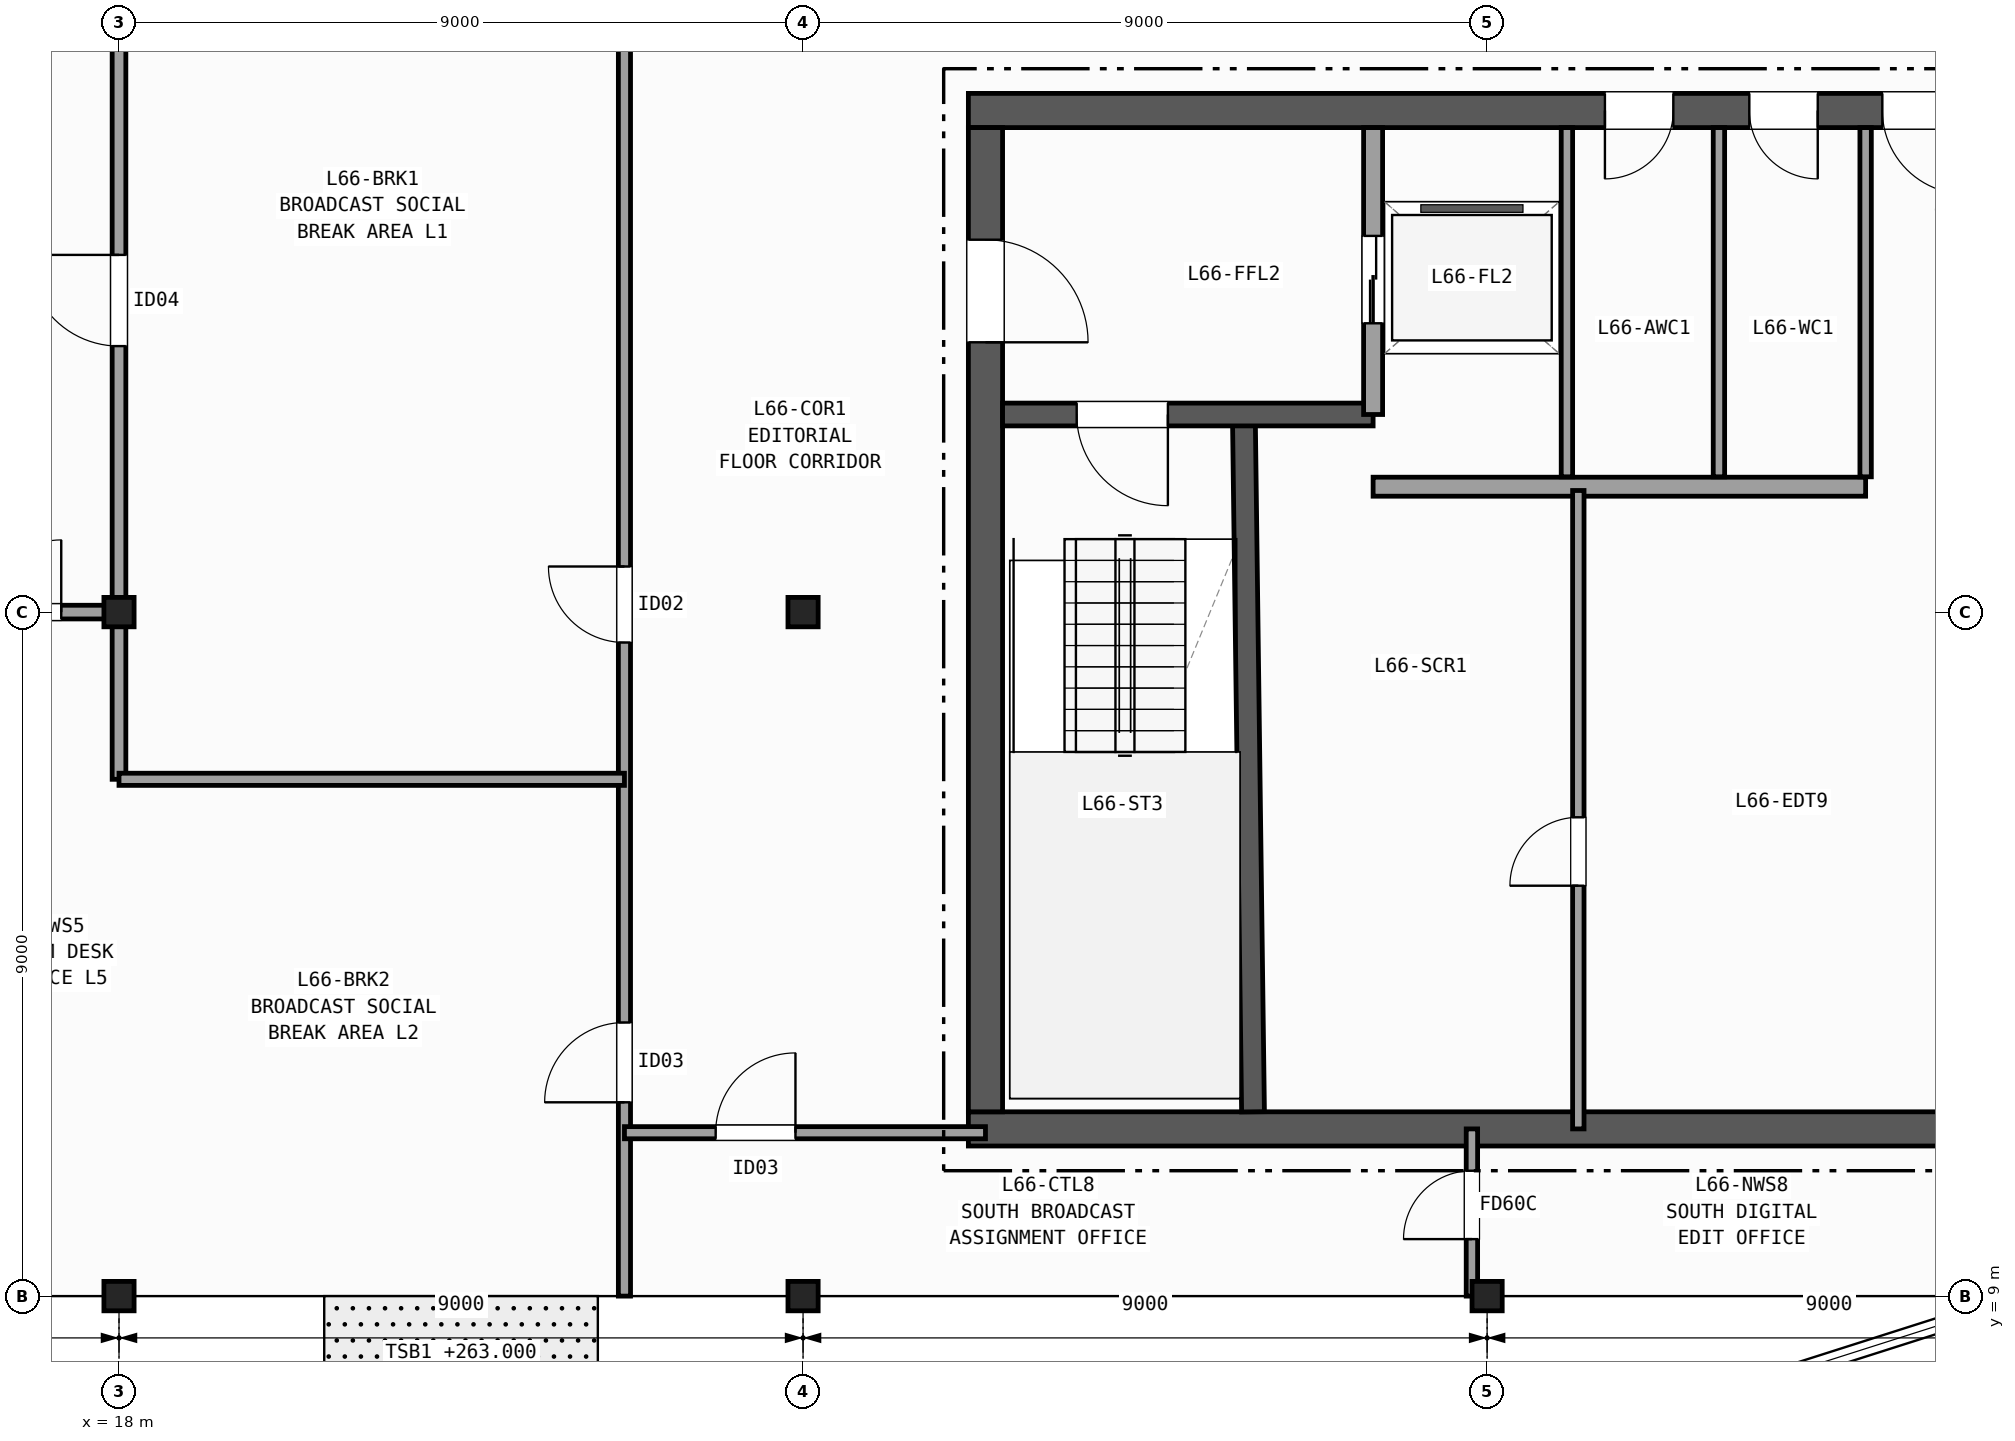
"""IFC4 building model, lengths in metres.
Left out: names, types, materials, properties, quantities, classifications, styles, units other than length and angle.
Written with IfcOpenShell. Run it as: python <this file> out.ifc"""

import sys

from ifc_helpers import new_model, si_unit, direction, frame, frame_2d, origin, origin_2d, place, context, subcontext, project, spatial, rectangle, i_section, extrude, element, fill, save


model = new_model("IFC4")
c1 = context("Model", 3, precision=1e-05, world=origin(), true_north=direction((0.0, 1.0)))
c2 = subcontext(c1, "Body", "Model", "MODEL_VIEW")
j1 = project(units=[si_unit("LENGTHUNIT", "METRE"), si_unit("PLANEANGLEUNIT", "RADIAN")], contexts=[c1])
p1 = place(None, origin())
s1 = spatial("IfcSite", under=j1, at=p1, CompositionType="ELEMENT")
p2 = place(p1, origin())
s2 = spatial("IfcBuilding", under=s1, at=p2, CompositionType="ELEMENT")
p3 = place(p2, frame((0.0, 0.0, 263.0)))
s3 = spatial("IfcBuildingStorey", under=s2, at=p3, CompositionType="ELEMENT", Elevation=263.0)
for number, where, z_axis, x_axis in (
    (1, (18.0, 9.0, 0.0), (0.0, 0.0, 1.0), (1.0, 0.0, 0.0)),
    (2, (18.0, 18.0, 0.0), (0.0, 0.0, 1.0), (1.0, 0.0, 0.0)),
    (3, (27.0, 9.0, 0.0), (0.0, 0.0, 1.0), (1.0, 0.0, 0.0)),
    (4, (27.0, 18.0, 0.0), (0.0, 0.0, 1.0), (1.0, 0.0, 0.0)),
    (5, (36.0, 9.0, 0.0), (0.0, 0.0, 1.0), (1.0, 0.0, 0.0)),
):
    element("IfcColumn", number, at=place(p3, frame(where, z_axis=z_axis, x_axis=x_axis)), inside=s3, PredefinedType="COLUMN", context=c2, shape_type="SweptSolid", body=[
        extrude(i_section(OverallWidth=0.397, OverallDepth=0.387, WebThickness=0.021, FlangeThickness=0.033, FilletRadius=0.015, at=origin_2d()), origin(), (0.0, 0.0, 1.0), 3.7),
    ])
p4 = place(p3, frame((29.175, 11.2, 0.0), z_axis=(0.0, 0.0, 1.0), x_axis=(1.0, 0.0, 0.0)))
e6 = element("IfcWall", 6, at=p4, inside=s3, PredefinedType="SHEAR", context=c2, shape_type="SweptSolid", body=[
    extrude(rectangle(XDim=13.85, YDim=0.45, at=frame_2d((6.925, 0.0))), origin(), (0.0, 0.0, 1.0), 3.42),
])
p5 = place(p3, frame((43.025, 24.6, 0.0), z_axis=(0.0, 0.0, 1.0), x_axis=(-1.0, 0.0, 0.0)))
e7 = element("IfcWall", 7, at=p5, inside=s3, PredefinedType="SHEAR", context=c2, shape_type="SweptSolid", body=[
    extrude(rectangle(XDim=13.85, YDim=0.45, at=frame_2d((6.925, 0.0))), origin(), (0.0, 0.0, 1.0), 3.42),
])
p6 = place(p5, frame((0.725, 0.0, 0.0)))
e8 = element("IfcOpeningElement", 8, at=p6, cuts=e7, PredefinedType="OPENING", context=c2, shape_type="SweptSolid", body=[
    extrude(rectangle(XDim=1.1, YDim=2.15, at=frame_2d((0.55, 1.075))), frame((0.0, 0.235, 0.0), z_axis=(0.0, -1.0, 0.0), x_axis=(1.0, 0.0, 0.0)), (0.0, 0.0, 1.0), 0.47),
])
p7 = place(p5, frame((2.675, 0.0, 0.0)))
e9 = element("IfcOpeningElement", 9, at=p7, cuts=e7, PredefinedType="OPENING", context=c2, shape_type="SweptSolid", body=[
    extrude(rectangle(XDim=0.9, YDim=2.1, at=frame_2d((0.45, 1.05))), frame((0.0, 0.235, 0.0), z_axis=(0.0, -1.0, 0.0), x_axis=(1.0, 0.0, 0.0)), (0.0, 0.0, 1.0), 0.47),
])
p8 = place(p5, frame((4.575, 0.0, 0.0)))
e10 = element("IfcOpeningElement", 10, at=p8, cuts=e7, PredefinedType="OPENING", context=c2, shape_type="SweptSolid", body=[
    extrude(rectangle(XDim=0.9, YDim=2.1, at=frame_2d((0.45, 1.05))), frame((0.0, 0.235, 0.0), z_axis=(0.0, -1.0, 0.0), x_axis=(1.0, 0.0, 0.0)), (0.0, 0.0, 1.0), 0.47),
])
p9 = place(p3, frame((29.4, 24.375, 0.0), z_axis=(0.0, 0.0, 1.0), x_axis=(0.0, -1.0, 0.0)))
e11 = element("IfcWall", 11, at=p9, inside=s3, PredefinedType="SHEAR", context=c2, shape_type="SweptSolid", body=[
    extrude(rectangle(XDim=12.95, YDim=0.45, at=frame_2d((6.475, 0.0))), origin(), (0.0, 0.0, 1.0), 3.42),
])
p10 = place(p9, frame((1.475, 0.0, 0.0)))
e12 = element("IfcOpeningElement", 12, at=p10, cuts=e11, PredefinedType="OPENING", context=c2, shape_type="SweptSolid", body=[
    extrude(rectangle(XDim=1.35, YDim=2.15, at=frame_2d((0.675, 1.075))), frame((0.0, 0.235, 0.0), z_axis=(0.0, -1.0, 0.0), x_axis=(1.0, 0.0, 0.0)), (0.0, 0.0, 1.0), 0.47),
])
p11 = place(p3, frame((32.92, 11.425, 0.0), z_axis=(0.0, 0.0, 1.0), x_axis=(-0.013135638869, 0.999913723774, 0.0)))
e13 = element("IfcWall", 13, at=p11, inside=s3, PredefinedType="SHEAR", context=c2, shape_type="SweptSolid", body=[
    extrude(rectangle(XDim=9.126, YDim=0.3, at=frame_2d((4.563, 0.0))), origin(), (0.0, 0.0, 1.0), 3.42),
])
p12 = place(p3, frame((34.5, 20.6, 0.0), z_axis=(0.0, 0.0, 1.0), x_axis=(-1.0, 0.0, 0.0)))
e14 = element("IfcWall", 14, at=p12, inside=s3, PredefinedType="SHEAR", context=c2, shape_type="SweptSolid", body=[
    extrude(rectangle(XDim=4.875, YDim=0.3, at=frame_2d((2.438, 0.0))), origin(), (0.0, 0.0, 1.0), 3.42),
])
p13 = place(p12, frame((2.7, 0.0, 0.0)))
e15 = element("IfcOpeningElement", 15, at=p13, cuts=e14, PredefinedType="OPENING", context=c2, shape_type="SweptSolid", body=[
    extrude(rectangle(XDim=1.2, YDim=2.15, at=frame_2d((0.6, 1.075))), frame((0.0, 0.16, 0.0), z_axis=(0.0, -1.0, 0.0), x_axis=(1.0, 0.0, 0.0)), (0.0, 0.0, 1.0), 0.32),
])
p14 = place(p3, frame((34.5, 20.6, 0.0), z_axis=(0.0, 0.0, 1.0), x_axis=(0.0, 1.0, 0.0)))
e16 = element("IfcWall", 16, at=p14, inside=s3, PredefinedType="PARTITIONING", context=c2, shape_type="SweptSolid", body=[
    extrude(rectangle(XDim=3.775, YDim=0.25, at=frame_2d((1.887, 0.0))), origin(), (0.0, 0.0, 1.0), 3.42),
])
p15 = place(p14, frame((1.2, 0.0, 0.0)))
e17 = element("IfcOpeningElement", 17, at=p15, cuts=e16, PredefinedType="OPENING", context=c2, shape_type="SweptSolid", body=[
    extrude(rectangle(XDim=1.15, YDim=2.15, at=frame_2d((0.575, 1.075))), frame((0.0, 0.135, 0.0), z_axis=(0.0, -1.0, 0.0), x_axis=(1.0, 0.0, 0.0)), (0.0, 0.0, 1.0), 0.27),
])
p16 = place(p3, frame((34.5, 19.65, 0.0), z_axis=(0.0, 0.0, 1.0), x_axis=(1.0, 0.0, 0.0)))
e18 = element("IfcWall", 18, at=p16, inside=s3, PredefinedType="PARTITIONING", context=c2, shape_type="SweptSolid", body=[
    extrude(rectangle(XDim=6.48, YDim=0.25, at=frame_2d((3.24, 0.0))), origin(), (0.0, 0.0, 1.0), 3.42),
])
p17 = place(p3, frame((37.2, 11.2, 0.0), z_axis=(0.0, 0.0, 1.0), x_axis=(0.0, 1.0, 0.0)))
e19 = element("IfcWall", 19, at=p17, inside=s3, PredefinedType="PARTITIONING", context=c2, shape_type="SweptSolid", body=[
    extrude(rectangle(XDim=8.4, YDim=0.15, at=frame_2d((4.2, 0.0))), origin(), (0.0, 0.0, 1.0), 3.42),
])
p18 = place(p17, frame((3.2, 0.0, 0.0)))
e20 = element("IfcOpeningElement", 20, at=p18, cuts=e19, PredefinedType="OPENING", context=c2, shape_type="SweptSolid", body=[
    extrude(rectangle(XDim=0.9, YDim=2.1, at=frame_2d((0.45, 1.05))), frame((0.0, 0.085, 0.0), z_axis=(0.0, -1.0, 0.0), x_axis=(1.0, 0.0, 0.0)), (0.0, 0.0, 1.0), 0.17),
])
for number, where, z_axis, x_axis in (
    (21, (37.05, 19.78, 0.0), (0.0, 0.0, 1.0), (0.0, 1.0, 0.0)),
    (22, (39.05, 19.78, 0.0), (0.0, 0.0, 1.0), (0.0, 1.0, 0.0)),
    (23, (40.98, 19.78, 0.0), (0.0, 0.0, 1.0), (0.0, 1.0, 0.0)),
):
    element("IfcWall", number, at=place(p3, frame(where, z_axis=z_axis, x_axis=x_axis)), inside=s3, PredefinedType="PARTITIONING", context=c2, shape_type="SweptSolid", body=[
        extrude(rectangle(XDim=4.595, YDim=0.15, at=frame_2d((2.297, 0.0))), origin(), (0.0, 0.0, 1.0), 3.42),
    ])
p19 = place(p3, frame((24.65, 9.0, 0.0), z_axis=(0.0, 0.0, 1.0), x_axis=(0.0, 1.0, 0.0)))
e24 = element("IfcWall", 24, at=p19, inside=s3, PredefinedType="PARTITIONING", context=c2, shape_type="SweptSolid", body=[
    extrude(rectangle(XDim=19.2, YDim=0.16, at=frame_2d((9.6, 0.0))), origin(), (0.0, 0.0, 1.0), 2.707),
])
p20 = place(p19, frame((8.6, 0.0, 0.0)))
e25 = element("IfcOpeningElement", 25, at=p20, cuts=e24, PredefinedType="OPENING", context=c2, shape_type="SweptSolid", body=[
    extrude(rectangle(XDim=1.0, YDim=2.1, at=frame_2d((0.5, 1.05))), frame((0.0, 0.09, 0.0), z_axis=(0.0, -1.0, 0.0), x_axis=(1.0, 0.0, 0.0)), (0.0, 0.0, 1.0), 0.18),
])
p21 = place(p19, frame((2.55, 0.0, 0.0)))
e26 = element("IfcOpeningElement", 26, at=p21, cuts=e24, PredefinedType="OPENING", context=c2, shape_type="SweptSolid", body=[
    extrude(rectangle(XDim=1.05, YDim=2.15, at=frame_2d((0.525, 1.075))), frame((0.0, 0.09, 0.0), z_axis=(0.0, -1.0, 0.0), x_axis=(1.0, 0.0, 0.0)), (0.0, 0.0, 1.0), 0.18),
])
p22 = place(p3, frame((9.0, 18.0, 0.0), z_axis=(0.0, 0.0, 1.0), x_axis=(1.0, 0.0, 0.0)))
e27 = element("IfcWall", 27, at=p22, inside=s3, PredefinedType="PARTITIONING", context=c2, shape_type="SweptSolid", body=[
    extrude(rectangle(XDim=9.08, YDim=0.18, at=frame_2d((4.54, 0.0))), origin(), (0.0, 0.0, 1.0), 2.707),
])
p23 = place(p22, frame((7.29, 0.0, 0.0)))
e28 = element("IfcOpeningElement", 28, at=p23, cuts=e27, PredefinedType="OPENING", context=c2, shape_type="SweptSolid", body=[
    extrude(rectangle(XDim=0.95, YDim=2.1, at=frame_2d((0.475, 1.05))), frame((0.0, 0.1, 0.0), z_axis=(0.0, -1.0, 0.0), x_axis=(1.0, 0.0, 0.0)), (0.0, 0.0, 1.0), 0.2),
])
p24 = place(p3, frame((18.0, 15.8, 0.0), z_axis=(0.0, 0.0, 1.0), x_axis=(0.0, 1.0, 0.0)))
e29 = element("IfcWall", 29, at=p24, inside=s3, PredefinedType="PARTITIONING", context=c2, shape_type="SweptSolid", body=[
    extrude(rectangle(XDim=12.33, YDim=0.18, at=frame_2d((6.165, 0.0))), origin(), (0.0, 0.0, 1.0), 2.789),
])
p25 = place(p24, frame((5.7, 0.0, 0.0)))
e30 = element("IfcOpeningElement", 30, at=p25, cuts=e29, PredefinedType="OPENING", context=c2, shape_type="SweptSolid", body=[
    extrude(rectangle(XDim=1.2, YDim=2.15, at=frame_2d((0.6, 1.075))), frame((0.0, 0.1, 0.0), z_axis=(0.0, -1.0, 0.0), x_axis=(1.0, 0.0, 0.0)), (0.0, 0.0, 1.0), 0.2),
])
p26 = place(p3, frame((18.0, 15.8, 0.0), z_axis=(0.0, 0.0, 1.0), x_axis=(1.0, 0.0, 0.0)))
e31 = element("IfcWall", 31, at=p26, inside=s3, PredefinedType="PARTITIONING", context=c2, shape_type="SweptSolid", body=[
    extrude(rectangle(XDim=6.65, YDim=0.16, at=frame_2d((3.325, 0.0))), origin(), (0.0, 0.0, 1.0), 2.789),
])
p27 = place(p3, frame((24.65, 11.15, 0.0), z_axis=(0.0, 0.0, 1.0), x_axis=(1.0, 0.0, 0.0)))
e32 = element("IfcWall", 32, at=p27, inside=s3, PredefinedType="PARTITIONING", context=c2, shape_type="SweptSolid", body=[
    extrude(rectangle(XDim=4.75, YDim=0.16, at=frame_2d((2.375, 0.0))), origin(), (0.0, 0.0, 1.0), 2.792),
])
p28 = place(p27, frame((1.2, 0.0, 0.0)))
e33 = element("IfcOpeningElement", 33, at=p28, cuts=e32, PredefinedType="OPENING", context=c2, shape_type="SweptSolid", body=[
    extrude(rectangle(XDim=1.05, YDim=2.15, at=frame_2d((0.525, 1.075))), frame((0.0, 0.09, 0.0), z_axis=(0.0, -1.0, 0.0), x_axis=(1.0, 0.0, 0.0)), (0.0, 0.0, 1.0), 0.18),
])
p29 = place(p3, frame((35.8, 9.0, 0.0), z_axis=(0.0, 0.0, 1.0), x_axis=(0.0, 1.0, 0.0)))
e34 = element("IfcWall", 34, at=p29, inside=s3, PredefinedType="PARTITIONING", context=c2, shape_type="SweptSolid", body=[
    extrude(rectangle(XDim=2.2, YDim=0.15, at=frame_2d((1.1, 0.0))), origin(), (0.0, 0.0, 1.0), 2.707),
])
p30 = place(p29, frame((0.75, 0.0, 0.0)))
e35 = element("IfcOpeningElement", 35, at=p30, cuts=e34, PredefinedType="OPENING", context=c2, shape_type="SweptSolid", body=[
    extrude(rectangle(XDim=0.9, YDim=2.1, at=frame_2d((0.45, 1.05))), frame((0.0, 0.085, 0.0), z_axis=(0.0, -1.0, 0.0), x_axis=(1.0, 0.0, 0.0)), (0.0, 0.0, 1.0), 0.17),
])
p31 = place(p13, origin())
e36 = element("IfcDoor", 36, at=p31, inside=s3, OperationType="SINGLE_SWING_LEFT", PredefinedType="DOOR", context=c2, shape_type="SweptSolid", body=[
    extrude(rectangle(XDim=1.2, YDim=2.15, at=frame_2d((0.6, 1.075))), frame((0.0, 0.025, 0.0), z_axis=(0.0, -1.0, 0.0), x_axis=(1.0, 0.0, 0.0)), (0.0, 0.0, 1.0), 0.05),
])
fill(e15, e36)
p32 = place(p10, origin())
e37 = element("IfcDoor", 37, at=p32, inside=s3, OperationType="SINGLE_SWING_RIGHT", PredefinedType="DOOR", context=c2, shape_type="SweptSolid", body=[
    extrude(rectangle(XDim=1.35, YDim=2.15, at=frame_2d((0.675, 1.075))), frame((0.0, 0.025, 0.0), z_axis=(0.0, -1.0, 0.0), x_axis=(1.0, 0.0, 0.0)), (0.0, 0.0, 1.0), 0.05),
])
fill(e12, e37)
p33 = place(p6, origin())
e38 = element("IfcDoor", 38, at=p33, inside=s3, OperationType="SINGLE_SWING_LEFT", PredefinedType="DOOR", context=c2, shape_type="SweptSolid", body=[
    extrude(rectangle(XDim=1.1, YDim=2.15, at=frame_2d((0.55, 1.075))), frame((0.0, 0.025, 0.0), z_axis=(0.0, -1.0, 0.0), x_axis=(1.0, 0.0, 0.0)), (0.0, 0.0, 1.0), 0.05),
])
fill(e8, e38)
p34 = place(p7, origin())
e39 = element("IfcDoor", 39, at=p34, inside=s3, OperationType="SINGLE_SWING_LEFT", PredefinedType="DOOR", context=c2, shape_type="SweptSolid", body=[
    extrude(rectangle(XDim=0.9, YDim=2.1, at=frame_2d((0.45, 1.05))), frame((0.0, 0.025, 0.0), z_axis=(0.0, -1.0, 0.0), x_axis=(1.0, 0.0, 0.0)), (0.0, 0.0, 1.0), 0.05),
])
fill(e9, e39)
p35 = place(p8, origin())
e40 = element("IfcDoor", 40, at=p35, inside=s3, OperationType="SINGLE_SWING_RIGHT", PredefinedType="DOOR", context=c2, shape_type="SweptSolid", body=[
    extrude(rectangle(XDim=0.9, YDim=2.1, at=frame_2d((0.45, 1.05))), frame((0.0, 0.025, 0.0), z_axis=(0.0, -1.0, 0.0), x_axis=(1.0, 0.0, 0.0)), (0.0, 0.0, 1.0), 0.05),
])
fill(e10, e40)
p36 = place(p15, origin())
e41 = element("IfcDoor", 41, at=p36, inside=s3, OperationType="DOUBLE_DOOR_SLIDING", PredefinedType="DOOR", context=c2, shape_type="SweptSolid", body=[
    extrude(rectangle(XDim=1.15, YDim=2.15, at=frame_2d((0.575, 1.075))), frame((0.0, 0.025, 0.0), z_axis=(0.0, -1.0, 0.0), x_axis=(1.0, 0.0, 0.0)), (0.0, 0.0, 1.0), 0.05),
])
fill(e17, e41)
p37 = place(p18, origin())
e42 = element("IfcDoor", 42, at=p37, inside=s3, OperationType="SINGLE_SWING_LEFT", PredefinedType="DOOR", context=c2, shape_type="SweptSolid", body=[
    extrude(rectangle(XDim=0.9, YDim=2.1, at=frame_2d((0.45, 1.05))), frame((0.0, 0.025, 0.0), z_axis=(0.0, -1.0, 0.0), x_axis=(1.0, 0.0, 0.0)), (0.0, 0.0, 1.0), 0.05),
])
fill(e20, e42)
p38 = place(p20, origin())
e43 = element("IfcDoor", 43, at=p38, inside=s3, OperationType="SINGLE_SWING_RIGHT", PredefinedType="DOOR", context=c2, shape_type="SweptSolid", body=[
    extrude(rectangle(XDim=1.0, YDim=2.1, at=frame_2d((0.5, 1.05))), frame((0.0, 0.025, 0.0), z_axis=(0.0, -1.0, 0.0), x_axis=(1.0, 0.0, 0.0)), (0.0, 0.0, 1.0), 0.05),
])
fill(e25, e43)
p39 = place(p21, origin())
e44 = element("IfcDoor", 44, at=p39, inside=s3, OperationType="SINGLE_SWING_LEFT", PredefinedType="DOOR", context=c2, shape_type="SweptSolid", body=[
    extrude(rectangle(XDim=1.05, YDim=2.15, at=frame_2d((0.525, 1.075))), frame((0.0, 0.025, 0.0), z_axis=(0.0, -1.0, 0.0), x_axis=(1.0, 0.0, 0.0)), (0.0, 0.0, 1.0), 0.05),
])
fill(e26, e44)
p40 = place(p25, origin())
e45 = element("IfcDoor", 45, at=p40, inside=s3, OperationType="SINGLE_SWING_RIGHT", PredefinedType="DOOR", context=c2, shape_type="SweptSolid", body=[
    extrude(rectangle(XDim=1.2, YDim=2.15, at=frame_2d((0.6, 1.075))), frame((0.0, 0.025, 0.0), z_axis=(0.0, -1.0, 0.0), x_axis=(1.0, 0.0, 0.0)), (0.0, 0.0, 1.0), 0.05),
])
fill(e30, e45)
p41 = place(p23, origin())
e46 = element("IfcDoor", 46, at=p41, inside=s3, OperationType="SINGLE_SWING_RIGHT", PredefinedType="DOOR", context=c2, shape_type="SweptSolid", body=[
    extrude(rectangle(XDim=0.95, YDim=2.1, at=frame_2d((0.475, 1.05))), frame((0.0, 0.025, 0.0), z_axis=(0.0, -1.0, 0.0), x_axis=(1.0, 0.0, 0.0)), (0.0, 0.0, 1.0), 0.05),
])
fill(e28, e46)
p42 = place(p28, origin())
e47 = element("IfcDoor", 47, at=p42, inside=s3, OperationType="SINGLE_SWING_RIGHT", PredefinedType="DOOR", context=c2, shape_type="SweptSolid", body=[
    extrude(rectangle(XDim=1.05, YDim=2.15, at=frame_2d((0.525, 1.075))), frame((0.0, 0.025, 0.0), z_axis=(0.0, -1.0, 0.0), x_axis=(1.0, 0.0, 0.0)), (0.0, 0.0, 1.0), 0.05),
])
fill(e33, e47)
p43 = place(p30, origin())
e48 = element("IfcDoor", 48, at=p43, inside=s3, OperationType="SINGLE_SWING_LEFT", PredefinedType="DOOR", context=c2, shape_type="SweptSolid", body=[
    extrude(rectangle(XDim=0.9, YDim=2.1, at=frame_2d((0.45, 1.05))), frame((0.0, 0.025, 0.0), z_axis=(0.0, -1.0, 0.0), x_axis=(1.0, 0.0, 0.0)), (0.0, 0.0, 1.0), 0.05),
])
fill(e35, e48)
save(model, sys.argv[1])
